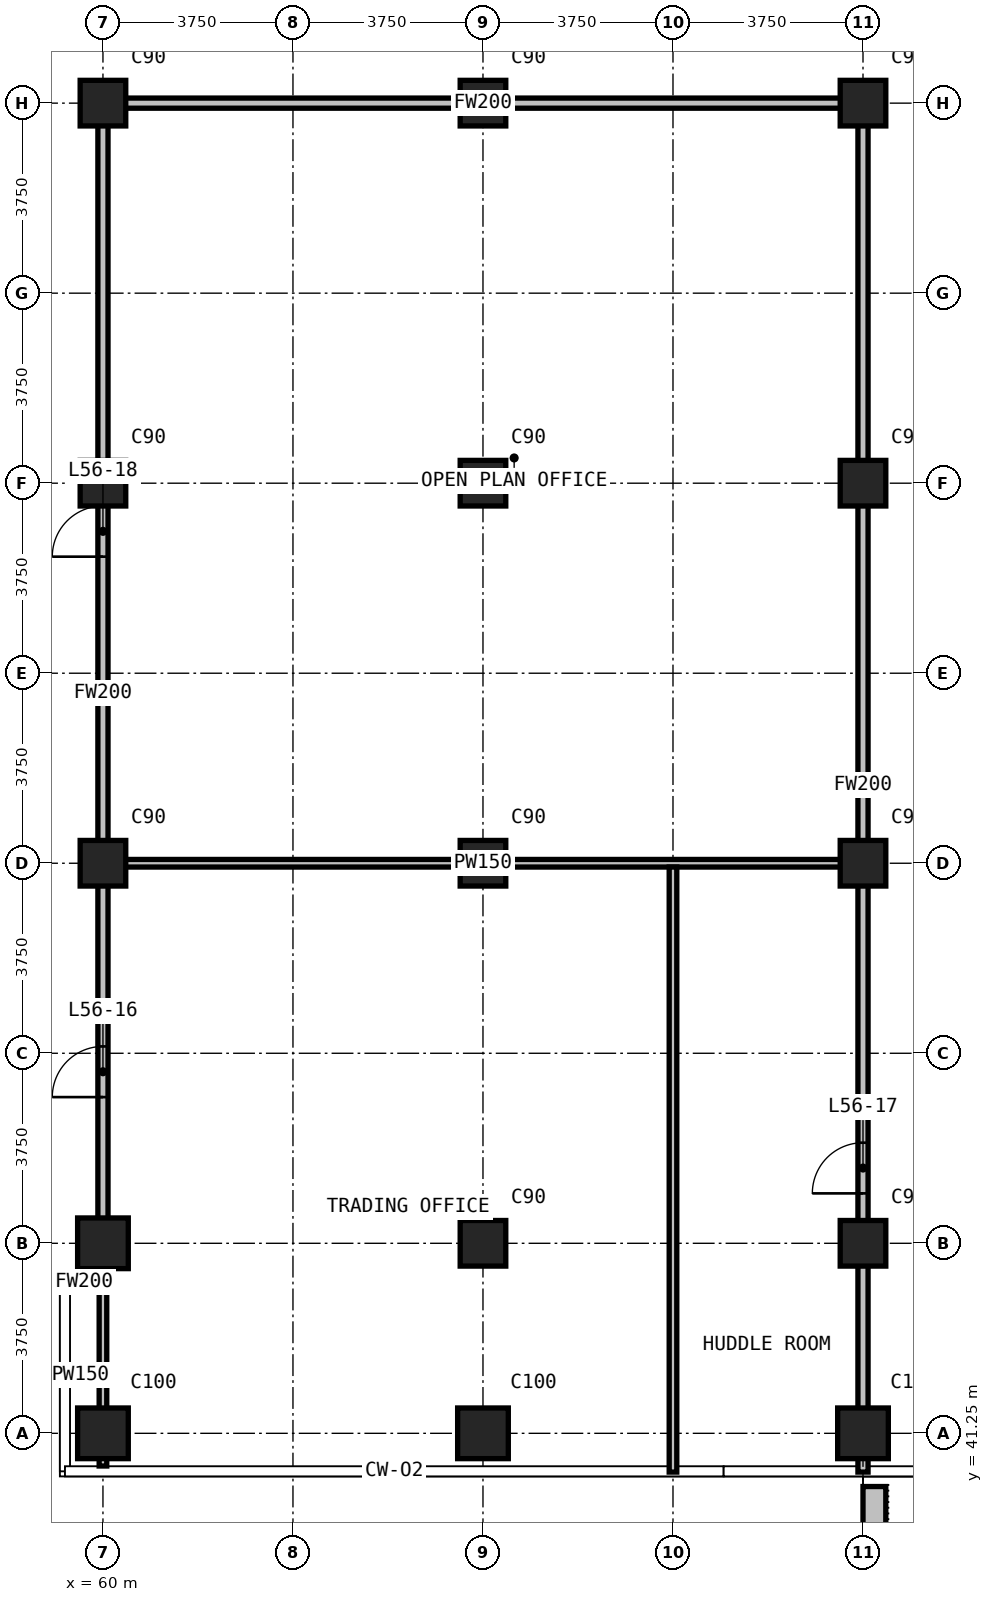
"""IFC4 building model, lengths in metres.
Left out: names, types, materials, properties, quantities, classifications, styles, units other than length and angle.
Written with IfcOpenShell. Run it as: python <this file> out.ifc"""

import sys

from ifc_helpers import new_model, si_unit, direction, frame, frame_2d, origin, origin_2d, place, context, subcontext, project, spatial, rectangle, extrude, element, fill, save


model = new_model("IFC4")
c1 = context("Model", 3, precision=1e-05, world=origin(), true_north=direction((0.0, 1.0)))
c2 = subcontext(c1, "Body", "Model", "MODEL_VIEW")
j1 = project(units=[si_unit("LENGTHUNIT", "METRE"), si_unit("PLANEANGLEUNIT", "RADIAN")], contexts=[c1])
p1 = place(None, origin())
s1 = spatial("IfcSite", under=j1, at=p1, CompositionType="ELEMENT")
p2 = place(p1, origin())
s2 = spatial("IfcBuilding", under=s1, at=p2, CompositionType="ELEMENT")
p3 = place(p2, frame((0.0, 0.0, 217.5)))
s3 = spatial("IfcBuildingStorey", under=s2, at=p3, CompositionType="ELEMENT", Elevation=217.5)
for number, where, z_axis, x_axis in (
    (1, (60.0, 41.25, 0.0), (0.0, 0.0, 1.0), (1.0, 0.0, 0.0)),
    (2, (60.0, 45.0, 0.0), (0.0, 0.0, 1.0), (1.0, 0.0, 0.0)),
):
    element("IfcColumn", number, at=place(p3, frame(where, z_axis=z_axis, x_axis=x_axis)), inside=s3, PredefinedType="COLUMN", context=c2, shape_type="SweptSolid", body=[
        extrude(rectangle(XDim=1.0, YDim=1.0, at=origin_2d()), origin(), (0.0, 0.0, 1.0), 3.6),
    ])
for number, where, z_axis, x_axis in (
    (3, (60.0, 52.5, 0.0), (0.0, 0.0, 1.0), (1.0, 0.0, 0.0)),
    (4, (60.0, 60.0, 0.0), (0.0, 0.0, 1.0), (1.0, 0.0, 0.0)),
    (5, (60.0, 67.5, 0.0), (0.0, 0.0, 1.0), (1.0, 0.0, 0.0)),
):
    element("IfcColumn", number, at=place(p3, frame(where, z_axis=z_axis, x_axis=x_axis)), inside=s3, PredefinedType="COLUMN", context=c2, shape_type="SweptSolid", body=[
        extrude(rectangle(XDim=0.9, YDim=0.9, at=origin_2d()), origin(), (0.0, 0.0, 1.0), 3.6),
    ])
p4 = place(p3, frame((67.5, 41.25, 0.0), z_axis=(0.0, 0.0, 1.0), x_axis=(1.0, 0.0, 0.0)))
e6 = element("IfcColumn", 6, at=p4, inside=s3, PredefinedType="COLUMN", context=c2, shape_type="SweptSolid", body=[
    extrude(rectangle(XDim=1.0, YDim=1.0, at=origin_2d()), origin(), (0.0, 0.0, 1.0), 3.6),
])
for number, where, z_axis, x_axis in (
    (7, (67.5, 45.0, 0.0), (0.0, 0.0, 1.0), (1.0, 0.0, 0.0)),
    (8, (67.5, 52.5, 0.0), (0.0, 0.0, 1.0), (1.0, 0.0, 0.0)),
    (9, (67.5, 60.0, 0.0), (0.0, 0.0, 1.0), (1.0, 0.0, 0.0)),
    (10, (67.5, 67.5, 0.0), (0.0, 0.0, 1.0), (1.0, 0.0, 0.0)),
):
    element("IfcColumn", number, at=place(p3, frame(where, z_axis=z_axis, x_axis=x_axis)), inside=s3, PredefinedType="COLUMN", context=c2, shape_type="SweptSolid", body=[
        extrude(rectangle(XDim=0.9, YDim=0.9, at=origin_2d()), origin(), (0.0, 0.0, 1.0), 3.6),
    ])
p5 = place(p3, frame((75.0, 41.25, 0.0), z_axis=(0.0, 0.0, 1.0), x_axis=(1.0, 0.0, 0.0)))
e11 = element("IfcColumn", 11, at=p5, inside=s3, PredefinedType="COLUMN", context=c2, shape_type="SweptSolid", body=[
    extrude(rectangle(XDim=1.0, YDim=1.0, at=origin_2d()), origin(), (0.0, 0.0, 1.0), 3.6),
])
for number, where, z_axis, x_axis in (
    (12, (75.0, 45.0, 0.0), (0.0, 0.0, 1.0), (1.0, 0.0, 0.0)),
    (13, (75.0, 52.5, 0.0), (0.0, 0.0, 1.0), (1.0, 0.0, 0.0)),
    (14, (75.0, 60.0, 0.0), (0.0, 0.0, 1.0), (1.0, 0.0, 0.0)),
    (15, (75.0, 67.5, 0.0), (0.0, 0.0, 1.0), (1.0, 0.0, 0.0)),
):
    element("IfcColumn", number, at=place(p3, frame(where, z_axis=z_axis, x_axis=x_axis)), inside=s3, PredefinedType="COLUMN", context=c2, shape_type="SweptSolid", body=[
        extrude(rectangle(XDim=0.9, YDim=0.9, at=origin_2d()), origin(), (0.0, 0.0, 1.0), 3.6),
    ])
p6 = place(p3, frame((75.225, 40.2, 0.0), z_axis=(0.0, 0.0, 1.0), x_axis=(0.0, -1.0, 0.0)))
e16 = element("IfcWall", 16, at=p6, inside=s3, PredefinedType="USERDEFINED", context=c2, shape_type="SweptSolid", body=[
    extrude(rectangle(XDim=2.35, YDim=0.45, at=frame_2d((1.175, 0.0))), origin(), (0.0, 0.0, 1.0), 1.1),
])
p7 = place(p3, frame((59.355, 44.235, 0.0), z_axis=(0.0, 0.0, 1.0), x_axis=(1.0, 0.0, 0.0)))
e17 = element("IfcWall", 17, at=p7, inside=s3, PredefinedType="PARTITIONING", context=c2, shape_type="SweptSolid", body=[
    extrude(rectangle(XDim=0.545, YDim=0.2, at=frame_2d((0.272, 0.0))), origin(), (0.0, 0.0, 1.0), 3.3),
])
p8 = place(p3, frame((60.1, 67.5, 0.0), z_axis=(0.0, 0.0, 1.0), x_axis=(1.0, 0.0, 0.0)))
e18 = element("IfcWall", 18, at=p8, inside=s3, PredefinedType="PARTITIONING", context=c2, shape_type="SweptSolid", body=[
    extrude(rectangle(XDim=14.8, YDim=0.2, at=frame_2d((7.4, 0.0))), origin(), (0.0, 0.0, 1.0), 3.3),
])
p9 = place(p3, frame((60.0, 44.135, 0.0), z_axis=(0.0, 0.0, 1.0), x_axis=(0.0, 1.0, 0.0)))
e19 = element("IfcWall", 19, at=p9, inside=s3, PredefinedType="PARTITIONING", context=c2, shape_type="SweptSolid", body=[
    extrude(rectangle(XDim=23.465, YDim=0.2, at=frame_2d((11.732, 0.0))), origin(), (0.0, 0.0, 1.0), 3.3),
])
p10 = place(p9, frame((3.75, 0.0, 0.0)))
e20 = element("IfcOpeningElement", 20, at=p10, cuts=e19, PredefinedType="OPENING", context=c2, shape_type="SweptSolid", body=[
    extrude(rectangle(XDim=1.0, YDim=2.2, at=frame_2d((0.5, 1.1))), frame((0.0, 0.11, 0.0), z_axis=(0.0, -1.0, 0.0), x_axis=(1.0, 0.0, 0.0)), (0.0, 0.0, 1.0), 0.22),
])
p11 = place(p9, frame((14.415, 0.0, 0.0)))
e21 = element("IfcOpeningElement", 21, at=p11, cuts=e19, PredefinedType="OPENING", context=c2, shape_type="SweptSolid", body=[
    extrude(rectangle(XDim=1.0, YDim=2.2, at=frame_2d((0.5, 1.1))), frame((0.0, 0.11, 0.0), z_axis=(0.0, -1.0, 0.0), x_axis=(1.0, 0.0, 0.0)), (0.0, 0.0, 1.0), 0.22),
])
p12 = place(p3, frame((75.0, 40.485, 0.0), z_axis=(0.0, 0.0, 1.0), x_axis=(0.0, 1.0, 0.0)))
e22 = element("IfcWall", 22, at=p12, inside=s3, PredefinedType="PARTITIONING", context=c2, shape_type="SweptSolid", body=[
    extrude(rectangle(XDim=27.115, YDim=0.2, at=frame_2d((13.558, 0.0))), origin(), (0.0, 0.0, 1.0), 3.3),
])
p13 = place(p12, frame((5.5, 0.0, 0.0)))
e23 = element("IfcOpeningElement", 23, at=p13, cuts=e22, PredefinedType="OPENING", context=c2, shape_type="SweptSolid", body=[
    extrude(rectangle(XDim=1.0, YDim=2.2, at=frame_2d((0.5, 1.1))), frame((0.0, 0.11, 0.0), z_axis=(0.0, -1.0, 0.0), x_axis=(1.0, 0.0, 0.0)), (0.0, 0.0, 1.0), 0.22),
])
p14 = place(p3, frame((60.1, 52.5, 0.0), z_axis=(0.0, 0.0, 1.0), x_axis=(1.0, 0.0, 0.0)))
e24 = element("IfcWall", 24, at=p14, inside=s3, PredefinedType="PARTITIONING", context=c2, shape_type="SweptSolid", body=[
    extrude(rectangle(XDim=14.8, YDim=0.15, at=frame_2d((7.4, 0.0))), origin(), (0.0, 0.0, 1.0), 3.3),
])
p15 = place(p3, frame((60.0, 40.605, 0.0), z_axis=(0.0, 0.0, 1.0), x_axis=(0.0, 1.0, 0.0)))
e25 = element("IfcWall", 25, at=p15, inside=s3, PredefinedType="PARTITIONING", context=c2, shape_type="SweptSolid", body=[
    extrude(rectangle(XDim=3.6, YDim=0.15, at=frame_2d((1.8, 0.0))), origin(), (0.0, 0.0, 1.0), 3.3),
])
p16 = place(p3, frame((71.25, 40.485, 0.0), z_axis=(0.0, 0.0, 1.0), x_axis=(0.0, 1.0, 0.0)))
e26 = element("IfcWall", 26, at=p16, inside=s3, PredefinedType="PARTITIONING", context=c2, shape_type="SweptSolid", body=[
    extrude(rectangle(XDim=11.94, YDim=0.15, at=frame_2d((5.97, 0.0))), origin(), (0.0, 0.0, 1.0), 3.3),
])
p17 = place(p10, origin())
e27 = element("IfcDoor", 27, at=p17, inside=s3, OperationType="SINGLE_SWING_RIGHT", PredefinedType="DOOR", context=c2, shape_type="SweptSolid", body=[
    extrude(rectangle(XDim=1.0, YDim=2.2, at=frame_2d((0.5, 1.1))), frame((0.0, 0.025, 0.0), z_axis=(0.0, -1.0, 0.0), x_axis=(1.0, 0.0, 0.0)), (0.0, 0.0, 1.0), 0.05),
])
fill(e20, e27)
p18 = place(p13, origin())
e28 = element("IfcDoor", 28, at=p18, inside=s3, OperationType="SINGLE_SWING_LEFT", PredefinedType="DOOR", context=c2, shape_type="SweptSolid", body=[
    extrude(rectangle(XDim=1.0, YDim=2.2, at=frame_2d((0.5, 1.1))), frame((0.0, 0.025, 0.0), z_axis=(0.0, -1.0, 0.0), x_axis=(1.0, 0.0, 0.0)), (0.0, 0.0, 1.0), 0.05),
])
fill(e23, e28)
p19 = place(p11, origin())
e29 = element("IfcDoor", 29, at=p19, inside=s3, OperationType="SINGLE_SWING_LEFT", PredefinedType="DOOR", context=c2, shape_type="SweptSolid", body=[
    extrude(rectangle(XDim=1.0, YDim=2.2, at=frame_2d((0.5, 1.1))), frame((0.0, 0.025, 0.0), z_axis=(0.0, -1.0, 0.0), x_axis=(1.0, 0.0, 0.0)), (0.0, 0.0, 1.0), 0.05),
])
fill(e21, e29)
save(model, sys.argv[1])
